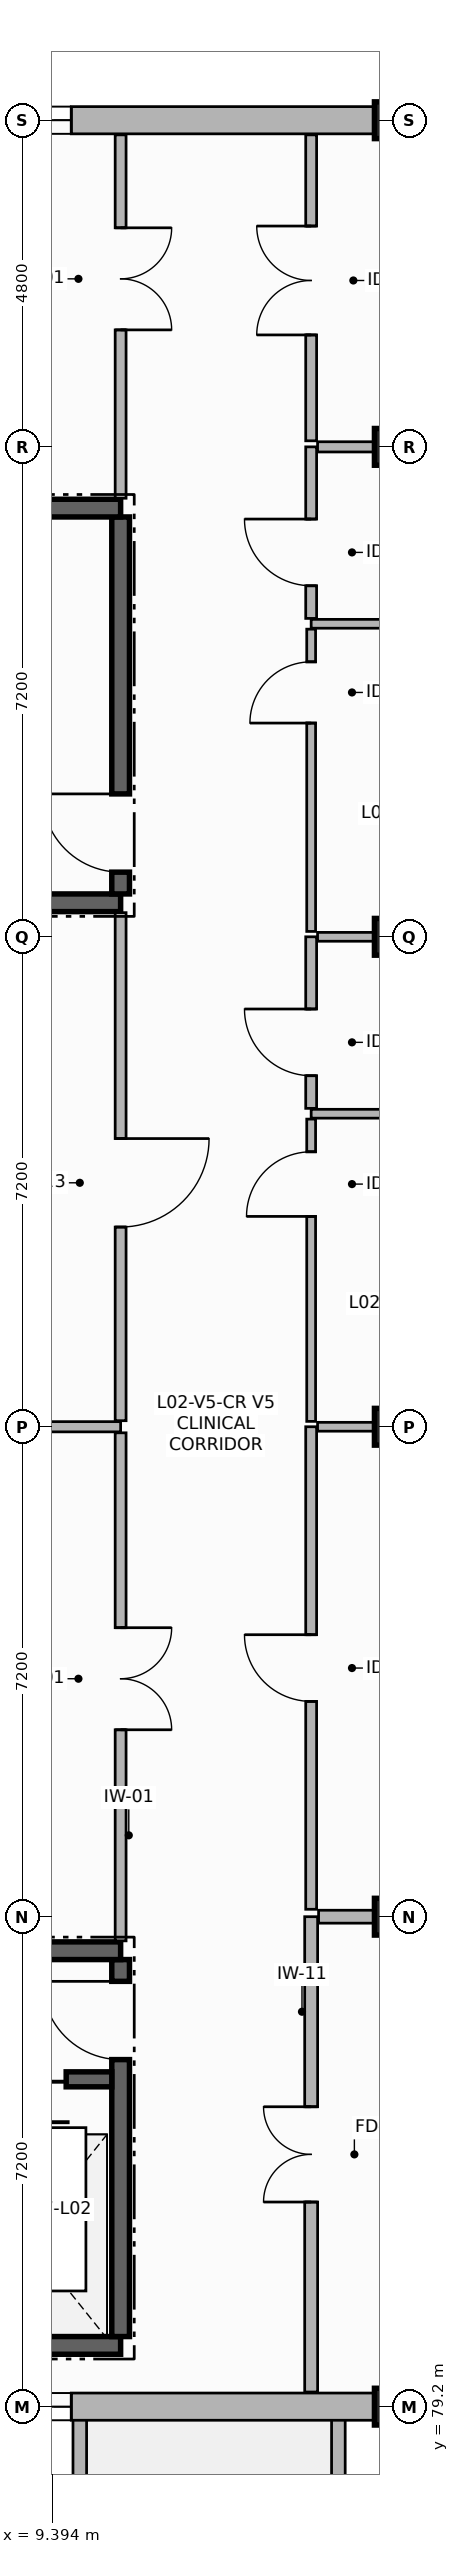
"""IFC4 building model, lengths in metres.
Left out: names, types, materials, properties, quantities, classifications, styles, units other than length and angle.
Written with IfcOpenShell. Run it as: python <this file> out.ifc"""

import sys

from ifc_helpers import new_model, si_unit, direction, frame, frame_2d, origin, origin_2d, place, context, subcontext, project, spatial, rectangle, extrude, element, fill, save


model = new_model("IFC4")
c1 = context("Model", 3, precision=1e-05, world=origin(), true_north=direction((0.0, 1.0)))
c2 = subcontext(c1, "Body", "Model", "MODEL_VIEW")
j1 = project(units=[si_unit("LENGTHUNIT", "METRE"), si_unit("PLANEANGLEUNIT", "RADIAN")], contexts=[c1])
p1 = place(None, origin())
s1 = spatial("IfcSite", under=j1, at=p1, CompositionType="ELEMENT")
p2 = place(p1, origin())
s2 = spatial("IfcBuilding", under=s1, at=p2, CompositionType="ELEMENT")
p3 = place(p2, frame((0.0, 0.0, 8.4)))
s3 = spatial("IfcBuildingStorey", under=s2, at=p3, CompositionType="ELEMENT", Elevation=8.4)
for number, where, z_axis, x_axis in (
    (1, (14.4, 79.2, 0.0), (0.0, 0.0, 1.0), (1.0, 0.0, 0.0)),
    (2, (14.4, 86.4, 0.0), (0.0, 0.0, 1.0), (1.0, 0.0, 0.0)),
    (3, (14.4, 93.6, 0.0), (0.0, 0.0, 1.0), (1.0, 0.0, 0.0)),
    (4, (14.4, 100.8, 0.0), (0.0, 0.0, 1.0), (1.0, 0.0, 0.0)),
    (5, (14.4, 108.0, 0.0), (0.0, 0.0, 1.0), (1.0, 0.0, 0.0)),
    (6, (14.4, 112.8, 0.0), (0.0, 0.0, 1.0), (1.0, 0.0, 0.0)),
):
    element("IfcColumn", number, at=place(p3, frame(where, z_axis=z_axis, x_axis=x_axis)), inside=s3, PredefinedType="COLUMN", context=c2, shape_type="SweptSolid", body=[
        extrude(rectangle(XDim=0.54, YDim=0.54, at=origin_2d()), origin(), (0.0, 0.0, 1.0), 3.59),
    ])
for number, where, z_axis, x_axis in (
    (7, (13.6, 57.72, 0.4), (0.0, 0.0, 1.0), (0.0, 1.0, 0.0)),
    (8, (9.8, 79.08, 0.4), (0.0, 0.0, 1.0), (0.0, -1.0, 0.0)),
):
    element("IfcWall", number, at=place(p3, frame(where, z_axis=z_axis, x_axis=x_axis)), inside=s3, PredefinedType="PARAPET", context=c2, shape_type="SweptSolid", body=[
        extrude(rectangle(XDim=21.36, YDim=0.2, at=frame_2d((10.68, 0.0))), origin(), (0.0, 0.0, 1.0), 0.95),
    ])
p4 = place(p3, frame((7.2, 79.2, 0.0), z_axis=(0.0, 0.0, 1.0), x_axis=(1.0, 0.0, 0.0)))
e9 = element("IfcWall", 9, at=p4, inside=s3, PredefinedType="SOLIDWALL", context=c2, shape_type="SweptSolid", body=[
    extrude(rectangle(XDim=7.2, YDim=0.4, at=frame_2d((3.6, 0.0))), origin(), (0.0, 0.0, 1.0), 2.92),
])
p5 = place(p4, frame((0.725, 0.0, 0.9)))
e10 = element("IfcOpeningElement", 10, at=p5, cuts=e9, PredefinedType="OPENING", context=c2, shape_type="SweptSolid", body=[
    extrude(rectangle(XDim=1.75, YDim=1.8, at=frame_2d((0.875, 0.9))), frame((0.0, 0.21, 0.0), z_axis=(0.0, -1.0, 0.0), x_axis=(1.0, 0.0, 0.0)), (0.0, 0.0, 1.0), 0.42),
])
p6 = place(p3, frame((14.4, 112.8, 0.0), z_axis=(0.0, 0.0, 1.0), x_axis=(-1.0, 0.0, 0.0)))
e11 = element("IfcWall", 11, at=p6, inside=s3, PredefinedType="SOLIDWALL", context=c2, shape_type="SweptSolid", body=[
    extrude(rectangle(XDim=7.2, YDim=0.4, at=frame_2d((3.6, 0.0))), origin(), (0.0, 0.0, 1.0), 2.92),
])
p7 = place(p6, frame((4.725, 0.0, 0.9)))
e12 = element("IfcOpeningElement", 12, at=p7, cuts=e11, PredefinedType="OPENING", context=c2, shape_type="SweptSolid", body=[
    extrude(rectangle(XDim=1.75, YDim=1.8, at=frame_2d((0.875, 0.9))), frame((0.0, 0.21, 0.0), z_axis=(0.0, -1.0, 0.0), x_axis=(1.0, 0.0, 0.0)), (0.0, 0.0, 1.0), 0.42),
])
p8 = place(p3, frame((0.9, 80.1, 0.0), z_axis=(0.0, 0.0, 1.0), x_axis=(1.0, 0.0, 0.0)))
e13 = element("IfcWall", 13, at=p8, inside=s3, PredefinedType="SHEAR", context=c2, shape_type="SweptSolid", body=[
    extrude(rectangle(XDim=9.5, YDim=0.26, at=frame_2d((4.75, 0.0))), origin(), (0.0, 0.0, 1.0), 3.59),
])
p9 = place(p3, frame((10.4, 80.23, 0.0), z_axis=(0.0, 0.0, 1.0), x_axis=(0.0, 1.0, 0.0)))
e14 = element("IfcWall", 14, at=p9, inside=s3, PredefinedType="SHEAR", context=c2, shape_type="SweptSolid", body=[
    extrude(rectangle(XDim=5.54, YDim=0.26, at=frame_2d((2.77, 0.0))), origin(), (0.0, 0.0, 1.0), 3.59),
])
p10 = place(p9, frame((4.07, 0.0, 0.0)))
e15 = element("IfcOpeningElement", 15, at=p10, cuts=e14, PredefinedType="OPENING", context=c2, shape_type="SweptSolid", body=[
    extrude(rectangle(XDim=1.15, YDim=2.2, at=frame_2d((0.575, 1.1))), frame((0.0, 0.14, 0.0), z_axis=(0.0, -1.0, 0.0), x_axis=(1.0, 0.0, 0.0)), (0.0, 0.0, 1.0), 0.28),
])
p11 = place(p3, frame((10.4, 85.9, 0.0), z_axis=(0.0, 0.0, 1.0), x_axis=(-1.0, 0.0, 0.0)))
e16 = element("IfcWall", 16, at=p11, inside=s3, PredefinedType="SHEAR", context=c2, shape_type="SweptSolid", body=[
    extrude(rectangle(XDim=9.5, YDim=0.26, at=frame_2d((4.75, 0.0))), origin(), (0.0, 0.0, 1.0), 3.59),
])
p12 = place(p3, frame((1.03, 84.01, 0.0), z_axis=(0.0, 0.0, 1.0), x_axis=(1.0, 0.0, 0.0)))
e17 = element("IfcWall", 17, at=p12, inside=s3, PredefinedType="SHEAR", context=c2, shape_type="SweptSolid", body=[
    extrude(rectangle(XDim=9.24, YDim=0.22, at=frame_2d((4.62, 0.0))), origin(), (0.0, 0.0, 1.0), 3.59),
])
p13 = place(p12, frame((0.32, 0.0, 0.0)))
e18 = element("IfcOpeningElement", 18, at=p13, cuts=e17, PredefinedType="OPENING", context=c2, shape_type="SweptSolid", body=[
    extrude(rectangle(XDim=1.1, YDim=2.15, at=frame_2d((0.55, 1.075))), frame((0.0, 0.12, 0.0), z_axis=(0.0, -1.0, 0.0), x_axis=(1.0, 0.0, 0.0)), (0.0, 0.0, 1.0), 0.24),
])
p14 = place(p12, frame((7.37, 0.0, 0.0)))
e19 = element("IfcOpeningElement", 19, at=p14, cuts=e17, PredefinedType="OPENING", context=c2, shape_type="SweptSolid", body=[
    extrude(rectangle(XDim=1.2, YDim=2.2, at=frame_2d((0.6, 1.1))), frame((0.0, 0.12, 0.0), z_axis=(0.0, -1.0, 0.0), x_axis=(1.0, 0.0, 0.0)), (0.0, 0.0, 1.0), 0.24),
])
p15 = place(p3, frame((0.9, 101.3, 0.0), z_axis=(0.0, 0.0, 1.0), x_axis=(1.0, 0.0, 0.0)))
e20 = element("IfcWall", 20, at=p15, inside=s3, PredefinedType="SHEAR", context=c2, shape_type="SweptSolid", body=[
    extrude(rectangle(XDim=9.5, YDim=0.26, at=frame_2d((4.75, 0.0))), origin(), (0.0, 0.0, 1.0), 3.59),
])
p16 = place(p3, frame((10.4, 101.43, 0.0), z_axis=(0.0, 0.0, 1.0), x_axis=(0.0, 1.0, 0.0)))
e21 = element("IfcWall", 21, at=p16, inside=s3, PredefinedType="SHEAR", context=c2, shape_type="SweptSolid", body=[
    extrude(rectangle(XDim=5.54, YDim=0.26, at=frame_2d((2.77, 0.0))), origin(), (0.0, 0.0, 1.0), 3.59),
])
p17 = place(p16, frame((0.32, 0.0, 0.0)))
e22 = element("IfcOpeningElement", 22, at=p17, cuts=e21, PredefinedType="OPENING", context=c2, shape_type="SweptSolid", body=[
    extrude(rectangle(XDim=1.15, YDim=2.2, at=frame_2d((0.575, 1.1))), frame((0.0, 0.14, 0.0), z_axis=(0.0, -1.0, 0.0), x_axis=(1.0, 0.0, 0.0)), (0.0, 0.0, 1.0), 0.28),
])
p18 = place(p3, frame((10.4, 107.1, 0.0), z_axis=(0.0, 0.0, 1.0), x_axis=(-1.0, 0.0, 0.0)))
e23 = element("IfcWall", 23, at=p18, inside=s3, PredefinedType="SHEAR", context=c2, shape_type="SweptSolid", body=[
    extrude(rectangle(XDim=9.5, YDim=0.26, at=frame_2d((4.75, 0.0))), origin(), (0.0, 0.0, 1.0), 3.59),
])
p19 = place(p3, frame((0.215, 93.6, 0.0), z_axis=(0.0, 0.0, 1.0), x_axis=(1.0, 0.0, 0.0)))
e24 = element("IfcWall", 24, at=p19, inside=s3, PredefinedType="PARTITIONING", context=c2, shape_type="SweptSolid", body=[
    extrude(rectangle(XDim=10.185, YDim=0.15, at=frame_2d((5.092, 0.0))), origin(), (0.0, 0.0, 1.0), 2.9),
])
p20 = place(p3, frame((10.4, 93.511, 0.0), z_axis=(0.0, 0.0, 1.0), x_axis=(0.0, -1.0, 0.0)))
e25 = element("IfcWall", 25, at=p20, inside=s3, PredefinedType="PARTITIONING", context=c2, shape_type="SweptSolid", body=[
    extrude(rectangle(XDim=7.466, YDim=0.16, at=frame_2d((3.733, 0.0))), origin(), (0.0, 0.0, 1.0), 2.9),
])
p21 = place(p20, frame((2.864, 0.0, 0.0)))
e26 = element("IfcOpeningElement", 26, at=p21, cuts=e25, PredefinedType="OPENING", context=c2, shape_type="SweptSolid", body=[
    extrude(rectangle(XDim=1.5, YDim=2.3, at=frame_2d((0.75, 1.15))), frame((0.0, 0.09, 0.0), z_axis=(0.0, -1.0, 0.0), x_axis=(1.0, 0.0, 0.0)), (0.0, 0.0, 1.0), 0.18),
])
p22 = place(p3, frame((10.4, 101.155, 0.0), z_axis=(0.0, 0.0, 1.0), x_axis=(0.0, -1.0, 0.0)))
e27 = element("IfcWall", 27, at=p22, inside=s3, PredefinedType="PARTITIONING", context=c2, shape_type="SweptSolid", body=[
    extrude(rectangle(XDim=7.466, YDim=0.16, at=frame_2d((3.733, 0.0))), origin(), (0.0, 0.0, 1.0), 2.9),
])
p23 = place(p22, frame((3.32, 0.0, 0.0)))
e28 = element("IfcOpeningElement", 28, at=p23, cuts=e27, PredefinedType="OPENING", context=c2, shape_type="SweptSolid", body=[
    extrude(rectangle(XDim=1.3, YDim=2.25, at=frame_2d((0.65, 1.125))), frame((0.0, 0.09, 0.0), z_axis=(0.0, -1.0, 0.0), x_axis=(1.0, 0.0, 0.0)), (0.0, 0.0, 1.0), 0.18),
])
p24 = place(p3, frame((10.4, 112.585, 0.0), z_axis=(0.0, 0.0, 1.0), x_axis=(0.0, -1.0, 0.0)))
e29 = element("IfcWall", 29, at=p24, inside=s3, PredefinedType="PARTITIONING", context=c2, shape_type="SweptSolid", body=[
    extrude(rectangle(XDim=5.34, YDim=0.16, at=frame_2d((2.67, 0.0))), origin(), (0.0, 0.0, 1.0), 2.9),
])
p25 = place(p24, frame((1.366, 0.0, 0.0)))
e30 = element("IfcOpeningElement", 30, at=p25, cuts=e29, PredefinedType="OPENING", context=c2, shape_type="SweptSolid", body=[
    extrude(rectangle(XDim=1.5, YDim=2.3, at=frame_2d((0.75, 1.15))), frame((0.0, 0.09, 0.0), z_axis=(0.0, -1.0, 0.0), x_axis=(1.0, 0.0, 0.0)), (0.0, 0.0, 1.0), 0.18),
])
p26 = place(p3, frame((13.2, 79.415, 0.0), z_axis=(0.0, 0.0, 1.0), x_axis=(0.0, 1.0, 0.0)))
e31 = element("IfcWall", 31, at=p26, inside=s3, PredefinedType="PARTITIONING", context=c2, shape_type="SweptSolid", body=[
    extrude(rectangle(XDim=6.985, YDim=0.19, at=frame_2d((3.492, 0.0))), origin(), (0.0, 0.0, 1.0), 2.9),
])
p27 = place(p26, frame((2.792, 0.0, 0.0)))
e32 = element("IfcOpeningElement", 32, at=p27, cuts=e31, PredefinedType="OPENING", context=c2, shape_type="SweptSolid", body=[
    extrude(rectangle(XDim=1.4, YDim=2.25, at=frame_2d((0.7, 1.125))), frame((0.0, 0.105, 0.0), z_axis=(0.0, -1.0, 0.0), x_axis=(1.0, 0.0, 0.0)), (0.0, 0.0, 1.0), 0.21),
])
p28 = place(p3, frame((13.309, 86.4, 0.0), z_axis=(0.0, 0.0, 1.0), x_axis=(1.0, 0.0, 0.0)))
e33 = element("IfcWall", 33, at=p28, inside=s3, PredefinedType="PARTITIONING", context=c2, shape_type="SweptSolid", body=[
    extrude(rectangle(XDim=15.276, YDim=0.19, at=frame_2d((7.638, 0.0))), origin(), (0.0, 0.0, 1.0), 2.9),
])
p29 = place(p3, frame((13.2, 86.509, 0.0), z_axis=(0.0, 0.0, 1.0), x_axis=(0.0, 1.0, 0.0)))
e34 = element("IfcWall", 34, at=p29, inside=s3, PredefinedType="PARTITIONING", context=c2, shape_type="SweptSolid", body=[
    extrude(rectangle(XDim=7.091, YDim=0.16, at=frame_2d((3.545, 0.0))), origin(), (0.0, 0.0, 1.0), 2.9),
])
p30 = place(p29, frame((3.055, 0.0, 0.0)))
e35 = element("IfcOpeningElement", 35, at=p30, cuts=e34, PredefinedType="OPENING", context=c2, shape_type="SweptSolid", body=[
    extrude(rectangle(XDim=0.98, YDim=2.15, at=frame_2d((0.49, 1.075))), frame((0.0, 0.09, 0.0), z_axis=(0.0, -1.0, 0.0), x_axis=(1.0, 0.0, 0.0)), (0.0, 0.0, 1.0), 0.18),
])
p31 = place(p3, frame((13.294, 93.6, 0.0), z_axis=(0.0, 0.0, 1.0), x_axis=(1.0, 0.0, 0.0)))
e36 = element("IfcWall", 36, at=p31, inside=s3, PredefinedType="PARTITIONING", context=c2, shape_type="SweptSolid", body=[
    extrude(rectangle(XDim=3.506, YDim=0.13, at=frame_2d((1.753, 0.0))), origin(), (0.0, 0.0, 1.0), 2.9),
])
p32 = place(p3, frame((13.2, 98.2, 0.0), z_axis=(0.0, 0.0, 1.0), x_axis=(1.0, 0.0, 0.0)))
e37 = element("IfcWall", 37, at=p32, inside=s3, PredefinedType="PARTITIONING", context=c2, shape_type="SweptSolid", body=[
    extrude(rectangle(XDim=3.6, YDim=0.13, at=frame_2d((1.8, 0.0))), origin(), (0.0, 0.0, 1.0), 2.9),
])
p33 = place(p3, frame((13.2, 93.679, 0.0), z_axis=(0.0, 0.0, 1.0), x_axis=(0.0, 1.0, 0.0)))
e38 = element("IfcWall", 38, at=p33, inside=s3, PredefinedType="PARTITIONING", context=c2, shape_type="SweptSolid", body=[
    extrude(rectangle(XDim=4.442, YDim=0.13, at=frame_2d((2.221, 0.0))), origin(), (0.0, 0.0, 1.0), 2.9),
])
p34 = place(p33, frame((3.012, 0.0, 0.0)))
e39 = element("IfcOpeningElement", 39, at=p34, cuts=e38, PredefinedType="OPENING", context=c2, shape_type="SweptSolid", body=[
    extrude(rectangle(XDim=0.95, YDim=2.1, at=frame_2d((0.475, 1.05))), frame((0.0, 0.075, 0.0), z_axis=(0.0, -1.0, 0.0), x_axis=(1.0, 0.0, 0.0)), (0.0, 0.0, 1.0), 0.15),
])
p35 = place(p3, frame((13.2, 98.279, 0.0), z_axis=(0.0, 0.0, 1.0), x_axis=(0.0, 1.0, 0.0)))
e40 = element("IfcWall", 40, at=p35, inside=s3, PredefinedType="PARTITIONING", context=c2, shape_type="SweptSolid", body=[
    extrude(rectangle(XDim=2.521, YDim=0.16, at=frame_2d((1.26, 0.0))), origin(), (0.0, 0.0, 1.0), 2.9),
])
p36 = place(p35, frame((0.48, 0.0, 0.0)))
e41 = element("IfcOpeningElement", 41, at=p36, cuts=e40, PredefinedType="OPENING", context=c2, shape_type="SweptSolid", body=[
    extrude(rectangle(XDim=0.98, YDim=2.15, at=frame_2d((0.49, 1.075))), frame((0.0, 0.09, 0.0), z_axis=(0.0, -1.0, 0.0), x_axis=(1.0, 0.0, 0.0)), (0.0, 0.0, 1.0), 0.18),
])
p37 = place(p3, frame((13.294, 100.8, 0.0), z_axis=(0.0, 0.0, 1.0), x_axis=(1.0, 0.0, 0.0)))
e42 = element("IfcWall", 42, at=p37, inside=s3, PredefinedType="PARTITIONING", context=c2, shape_type="SweptSolid", body=[
    extrude(rectangle(XDim=3.506, YDim=0.13, at=frame_2d((1.753, 0.0))), origin(), (0.0, 0.0, 1.0), 2.9),
])
p38 = place(p3, frame((13.2, 105.4, 0.0), z_axis=(0.0, 0.0, 1.0), x_axis=(1.0, 0.0, 0.0)))
e43 = element("IfcWall", 43, at=p38, inside=s3, PredefinedType="PARTITIONING", context=c2, shape_type="SweptSolid", body=[
    extrude(rectangle(XDim=3.6, YDim=0.13, at=frame_2d((1.8, 0.0))), origin(), (0.0, 0.0, 1.0), 2.9),
])
p39 = place(p3, frame((13.2, 100.879, 0.0), z_axis=(0.0, 0.0, 1.0), x_axis=(0.0, 1.0, 0.0)))
e44 = element("IfcWall", 44, at=p39, inside=s3, PredefinedType="PARTITIONING", context=c2, shape_type="SweptSolid", body=[
    extrude(rectangle(XDim=4.442, YDim=0.13, at=frame_2d((2.221, 0.0))), origin(), (0.0, 0.0, 1.0), 2.9),
])
p40 = place(p39, frame((3.062, 0.0, 0.0)))
e45 = element("IfcOpeningElement", 45, at=p40, cuts=e44, PredefinedType="OPENING", context=c2, shape_type="SweptSolid", body=[
    extrude(rectangle(XDim=0.9, YDim=2.1, at=frame_2d((0.45, 1.05))), frame((0.0, 0.075, 0.0), z_axis=(0.0, -1.0, 0.0), x_axis=(1.0, 0.0, 0.0)), (0.0, 0.0, 1.0), 0.15),
])
p41 = place(p3, frame((13.2, 105.479, 0.0), z_axis=(0.0, 0.0, 1.0), x_axis=(0.0, 1.0, 0.0)))
e46 = element("IfcWall", 46, at=p41, inside=s3, PredefinedType="PARTITIONING", context=c2, shape_type="SweptSolid", body=[
    extrude(rectangle(XDim=2.521, YDim=0.16, at=frame_2d((1.26, 0.0))), origin(), (0.0, 0.0, 1.0), 2.9),
])
p42 = place(p41, frame((0.48, 0.0, 0.0)))
e47 = element("IfcOpeningElement", 47, at=p42, cuts=e46, PredefinedType="OPENING", context=c2, shape_type="SweptSolid", body=[
    extrude(rectangle(XDim=0.98, YDim=2.15, at=frame_2d((0.49, 1.075))), frame((0.0, 0.09, 0.0), z_axis=(0.0, -1.0, 0.0), x_axis=(1.0, 0.0, 0.0)), (0.0, 0.0, 1.0), 0.18),
])
p43 = place(p3, frame((13.294, 108.0, 0.0), z_axis=(0.0, 0.0, 1.0), x_axis=(1.0, 0.0, 0.0)))
e48 = element("IfcWall", 48, at=p43, inside=s3, PredefinedType="PARTITIONING", context=c2, shape_type="SweptSolid", body=[
    extrude(rectangle(XDim=15.291, YDim=0.15, at=frame_2d((7.646, 0.0))), origin(), (0.0, 0.0, 1.0), 2.9),
])
p44 = place(p3, frame((13.2, 108.089, 0.0), z_axis=(0.0, 0.0, 1.0), x_axis=(0.0, 1.0, 0.0)))
e49 = element("IfcWall", 49, at=p44, inside=s3, PredefinedType="PARTITIONING", context=c2, shape_type="SweptSolid", body=[
    extrude(rectangle(XDim=4.496, YDim=0.16, at=frame_2d((2.248, 0.0))), origin(), (0.0, 0.0, 1.0), 2.9),
])
p45 = place(p44, frame((1.556, 0.0, 0.0)))
e50 = element("IfcOpeningElement", 50, at=p45, cuts=e49, PredefinedType="OPENING", context=c2, shape_type="SweptSolid", body=[
    extrude(rectangle(XDim=1.6, YDim=2.3, at=frame_2d((0.8, 1.15))), frame((0.0, 0.09, 0.0), z_axis=(0.0, -1.0, 0.0), x_axis=(1.0, 0.0, 0.0)), (0.0, 0.0, 1.0), 0.18),
])
p46 = place(p5, origin())
e51 = element("IfcWindow", 51, at=p46, inside=s3, PartitioningType="SINGLE_PANEL", PredefinedType="WINDOW", context=c2, shape_type="SweptSolid", body=[
    extrude(rectangle(XDim=1.75, YDim=1.8, at=frame_2d((0.875, 0.9))), frame((0.0, 0.03, 0.0), z_axis=(0.0, -1.0, 0.0), x_axis=(1.0, 0.0, 0.0)), (0.0, 0.0, 1.0), 0.06),
])
fill(e10, e51)
p47 = place(p7, origin())
e52 = element("IfcWindow", 52, at=p47, inside=s3, PartitioningType="SINGLE_PANEL", PredefinedType="WINDOW", context=c2, shape_type="SweptSolid", body=[
    extrude(rectangle(XDim=1.75, YDim=1.8, at=frame_2d((0.875, 0.9))), frame((0.0, 0.03, 0.0), z_axis=(0.0, -1.0, 0.0), x_axis=(1.0, 0.0, 0.0)), (0.0, 0.0, 1.0), 0.06),
])
fill(e12, e52)
p48 = place(p14, origin())
e53 = element("IfcDoor", 53, at=p48, inside=s3, OperationType="DOUBLE_DOOR_SLIDING", PredefinedType="DOOR", context=c2, shape_type="SweptSolid", body=[
    extrude(rectangle(XDim=1.2, YDim=2.2, at=frame_2d((0.6, 1.1))), frame((0.0, 0.025, 0.0), z_axis=(0.0, -1.0, 0.0), x_axis=(1.0, 0.0, 0.0)), (0.0, 0.0, 1.0), 0.05),
])
fill(e19, e53)
p49 = place(p10, origin())
e54 = element("IfcDoor", 54, at=p49, inside=s3, OperationType="SINGLE_SWING_RIGHT", PredefinedType="DOOR", context=c2, shape_type="SweptSolid", body=[
    extrude(rectangle(XDim=1.15, YDim=2.2, at=frame_2d((0.575, 1.1))), frame((0.0, 0.025, 0.0), z_axis=(0.0, -1.0, 0.0), x_axis=(1.0, 0.0, 0.0)), (0.0, 0.0, 1.0), 0.05),
])
fill(e15, e54)
p50 = place(p17, origin())
e55 = element("IfcDoor", 55, at=p50, inside=s3, OperationType="SINGLE_SWING_RIGHT", PredefinedType="DOOR", context=c2, shape_type="SweptSolid", body=[
    extrude(rectangle(XDim=1.15, YDim=2.2, at=frame_2d((0.575, 1.1))), frame((0.0, 0.025, 0.0), z_axis=(0.0, -1.0, 0.0), x_axis=(1.0, 0.0, 0.0)), (0.0, 0.0, 1.0), 0.05),
])
fill(e22, e55)
p51 = place(p21, origin())
e56 = element("IfcDoor", 56, at=p51, inside=s3, OperationType="DOUBLE_DOOR_SINGLE_SWING", PredefinedType="DOOR", context=c2, shape_type="SweptSolid", body=[
    extrude(rectangle(XDim=1.5, YDim=2.3, at=frame_2d((0.75, 1.15))), frame((0.0, 0.025, 0.0), z_axis=(0.0, -1.0, 0.0), x_axis=(1.0, 0.0, 0.0)), (0.0, 0.0, 1.0), 0.05),
])
fill(e26, e56)
p52 = place(p23, origin())
e57 = element("IfcDoor", 57, at=p52, inside=s3, OperationType="SINGLE_SWING_LEFT", PredefinedType="DOOR", context=c2, shape_type="SweptSolid", body=[
    extrude(rectangle(XDim=1.3, YDim=2.25, at=frame_2d((0.65, 1.125))), frame((0.0, 0.025, 0.0), z_axis=(0.0, -1.0, 0.0), x_axis=(1.0, 0.0, 0.0)), (0.0, 0.0, 1.0), 0.05),
])
fill(e28, e57)
p53 = place(p25, origin())
e58 = element("IfcDoor", 58, at=p53, inside=s3, OperationType="DOUBLE_DOOR_SINGLE_SWING", PredefinedType="DOOR", context=c2, shape_type="SweptSolid", body=[
    extrude(rectangle(XDim=1.5, YDim=2.3, at=frame_2d((0.75, 1.15))), frame((0.0, 0.025, 0.0), z_axis=(0.0, -1.0, 0.0), x_axis=(1.0, 0.0, 0.0)), (0.0, 0.0, 1.0), 0.05),
])
fill(e30, e58)
p54 = place(p27, origin())
e59 = element("IfcDoor", 59, at=p54, inside=s3, OperationType="DOUBLE_DOOR_SINGLE_SWING", PredefinedType="DOOR", context=c2, shape_type="SweptSolid", body=[
    extrude(rectangle(XDim=1.4, YDim=2.25, at=frame_2d((0.7, 1.125))), frame((0.0, 0.025, 0.0), z_axis=(0.0, -1.0, 0.0), x_axis=(1.0, 0.0, 0.0)), (0.0, 0.0, 1.0), 0.05),
])
fill(e32, e59)
p55 = place(p30, origin())
e60 = element("IfcDoor", 60, at=p55, inside=s3, OperationType="SINGLE_SWING_RIGHT", PredefinedType="DOOR", context=c2, shape_type="SweptSolid", body=[
    extrude(rectangle(XDim=0.98, YDim=2.15, at=frame_2d((0.49, 1.075))), frame((0.0, 0.025, 0.0), z_axis=(0.0, -1.0, 0.0), x_axis=(1.0, 0.0, 0.0)), (0.0, 0.0, 1.0), 0.05),
])
fill(e35, e60)
p56 = place(p34, origin())
e61 = element("IfcDoor", 61, at=p56, inside=s3, OperationType="SINGLE_SWING_LEFT", PredefinedType="DOOR", context=c2, shape_type="SweptSolid", body=[
    extrude(rectangle(XDim=0.95, YDim=2.1, at=frame_2d((0.475, 1.05))), frame((0.0, 0.025, 0.0), z_axis=(0.0, -1.0, 0.0), x_axis=(1.0, 0.0, 0.0)), (0.0, 0.0, 1.0), 0.05),
])
fill(e39, e61)
p57 = place(p36, origin())
e62 = element("IfcDoor", 62, at=p57, inside=s3, OperationType="SINGLE_SWING_RIGHT", PredefinedType="DOOR", context=c2, shape_type="SweptSolid", body=[
    extrude(rectangle(XDim=0.98, YDim=2.15, at=frame_2d((0.49, 1.075))), frame((0.0, 0.025, 0.0), z_axis=(0.0, -1.0, 0.0), x_axis=(1.0, 0.0, 0.0)), (0.0, 0.0, 1.0), 0.05),
])
fill(e41, e62)
p58 = place(p40, origin())
e63 = element("IfcDoor", 63, at=p58, inside=s3, OperationType="SINGLE_SWING_LEFT", PredefinedType="DOOR", context=c2, shape_type="SweptSolid", body=[
    extrude(rectangle(XDim=0.9, YDim=2.1, at=frame_2d((0.45, 1.05))), frame((0.0, 0.025, 0.0), z_axis=(0.0, -1.0, 0.0), x_axis=(1.0, 0.0, 0.0)), (0.0, 0.0, 1.0), 0.05),
])
fill(e45, e63)
p59 = place(p42, origin())
e64 = element("IfcDoor", 64, at=p59, inside=s3, OperationType="SINGLE_SWING_RIGHT", PredefinedType="DOOR", context=c2, shape_type="SweptSolid", body=[
    extrude(rectangle(XDim=0.98, YDim=2.15, at=frame_2d((0.49, 1.075))), frame((0.0, 0.025, 0.0), z_axis=(0.0, -1.0, 0.0), x_axis=(1.0, 0.0, 0.0)), (0.0, 0.0, 1.0), 0.05),
])
fill(e47, e64)
p60 = place(p45, origin())
e65 = element("IfcDoor", 65, at=p60, inside=s3, OperationType="DOUBLE_DOOR_SINGLE_SWING", PredefinedType="DOOR", context=c2, shape_type="SweptSolid", body=[
    extrude(rectangle(XDim=1.6, YDim=2.3, at=frame_2d((0.8, 1.15))), frame((0.0, 0.025, 0.0), z_axis=(0.0, -1.0, 0.0), x_axis=(1.0, 0.0, 0.0)), (0.0, 0.0, 1.0), 0.05),
])
fill(e50, e65)
save(model, sys.argv[1])
